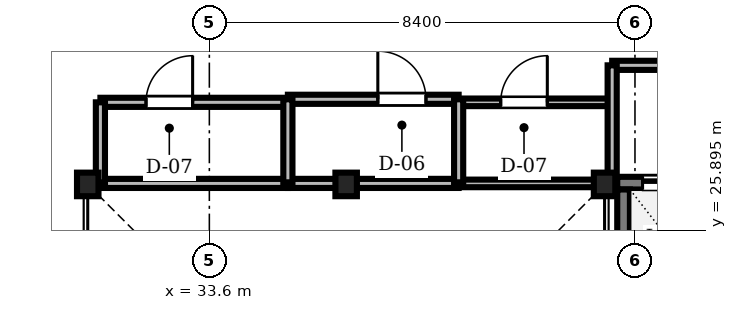
"""IFC4 building model, lengths in metres.
Left out: names, types, materials, properties, quantities, classifications, styles, units other than length and angle.
Written with IfcOpenShell. Run it as: python <this file> out.ifc"""

import sys

from ifc_helpers import new_model, si_unit, direction, frame, frame_2d, origin, origin_2d, place, context, subcontext, project, spatial, rectangle, i_section, extrude, source, transform, mapped, element, fill, save


model = new_model("IFC4")
c1 = context("Model", 3, precision=1e-05, world=origin(), true_north=direction((0.0, 1.0)))
c2 = subcontext(c1, "Body", "Model", "MODEL_VIEW")
j1 = project(units=[si_unit("LENGTHUNIT", "METRE"), si_unit("PLANEANGLEUNIT", "RADIAN")], contexts=[c1])
p1 = place(None, origin())
s1 = spatial("IfcSite", under=j1, at=p1, CompositionType="ELEMENT")
p2 = place(p1, origin())
s2 = spatial("IfcBuilding", under=s1, at=p2, CompositionType="ELEMENT")
p3 = place(p2, frame((0.0, 0.0, 103.7)))
s3 = spatial("IfcBuildingStorey", under=s2, at=p3, CompositionType="ELEMENT", Elevation=103.7)
m1 = source(origin(), c2, "Body", "SweptSolid", [
    extrude(i_section(OverallWidth=0.424, OverallDepth=0.465, WebThickness=0.035, FlangeThickness=0.056, FilletRadius=0.015, at=origin_2d()), origin(), (0.0, 0.0, 1.0), 3.56),
])
for number, where, z_axis, x_axis in (
    (1, (41.4, 26.8, 0.0), (0.0, 0.0, 1.0), (1.0, 0.0, 0.0)),
    (2, (36.3, 26.8, 0.0), (0.0, 0.0, 1.0), (1.0, 0.0, 0.0)),
    (3, (31.2, 26.8, 0.0), (0.0, 0.0, 1.0), (1.0, 0.0, 0.0)),
):
    element("IfcColumn", number, at=place(p3, frame(where, z_axis=z_axis, x_axis=x_axis)), inside=s3, PredefinedType="COLUMN", context=c2, shape_type="MappedRepresentation", body=[
        mapped(m1, transform((0.0, 0.0, 0.0), scale=1.0)),
    ])
m2 = source(origin(), c2, "Body", "SweptSolid", [
    extrude(rectangle(XDim=2.3, YDim=0.25, at=frame_2d((1.15, 0.0))), origin(), (0.0, 0.0, 1.0), 3.56),
])
p4 = place(p3, frame((41.65, 26.825, 0.0), z_axis=(0.0, 0.0, 1.0), x_axis=(1.0, 0.0, 0.0)))
e4 = element("IfcWall", 4, at=p4, inside=s3, PredefinedType="SOLIDWALL", context=c2, shape_type="MappedRepresentation", body=[
    mapped(m2, transform((0.0, 0.0, 0.0), scale=1.0)),
])
m3 = source(origin(), c2, "Body", "SweptSolid", [
    extrude(rectangle(XDim=1.3, YDim=2.3, at=frame_2d((0.65, 1.15))), frame((0.0, 0.135, 0.0), z_axis=(0.0, -1.0, 0.0), x_axis=(1.0, 0.0, 0.0)), (0.0, 0.0, 1.0), 0.27),
])
p5 = place(p4, frame((0.5, 0.0, 0.0)))
e5 = element("IfcOpeningElement", 5, at=p5, cuts=e4, PredefinedType="OPENING", context=c2, shape_type="MappedRepresentation", body=[
    mapped(m3, transform((0.0, 0.0, 0.0), scale=1.0)),
])
p6 = place(p3, frame((41.775, 24.4, 0.0), z_axis=(0.0, 0.0, 1.0), x_axis=(0.0, 1.0, 0.0)))
e6 = element("IfcWall", 6, at=p6, inside=s3, PredefinedType="SOLIDWALL", context=c2, shape_type="MappedRepresentation", body=[
    mapped(m2, transform((0.0, 0.0, 0.0), scale=1.0)),
])
m4 = source(origin(), c2, "Body", "SweptSolid", [
    extrude(rectangle(XDim=4.548, YDim=0.18, at=frame_2d((2.274, 0.0))), origin(), (0.0, 0.0, 1.0), 3.192),
])
p7 = place(p3, frame((41.55, 29.15, 0.0), z_axis=(0.0, 0.0, 1.0), x_axis=(1.0, 0.0, 0.0)))
e7 = element("IfcWall", 7, at=p7, inside=s3, PredefinedType="PARTITIONING", context=c2, shape_type="MappedRepresentation", body=[
    mapped(m4, transform((0.0, 0.0, 0.0), scale=1.0)),
])
m5 = source(origin(), c2, "Body", "SweptSolid", [
    extrude(rectangle(XDim=1.2, YDim=2.2, at=frame_2d((0.6, 1.1))), frame((0.0, 0.1, 0.0), z_axis=(0.0, -1.0, 0.0), x_axis=(1.0, 0.0, 0.0)), (0.0, 0.0, 1.0), 0.2),
])
p8 = place(p7, frame((1.6, 0.0, 0.0)))
e8 = element("IfcOpeningElement", 8, at=p8, cuts=e7, PredefinedType="OPENING", context=c2, shape_type="MappedRepresentation", body=[
    mapped(m5, transform((0.0, 0.0, 0.0), scale=1.0)),
])
m6 = source(origin(), c2, "Body", "SweptSolid", [
    extrude(rectangle(XDim=3.7, YDim=0.18, at=frame_2d((1.85, 0.0))), origin(), (0.0, 0.0, 1.0), 3.192),
])
p9 = place(p3, frame((31.45, 28.42, 0.0), z_axis=(0.0, 0.0, 1.0), x_axis=(1.0, 0.0, 0.0)))
e9 = element("IfcWall", 9, at=p9, inside=s3, PredefinedType="PARTITIONING", context=c2, shape_type="MappedRepresentation", body=[
    mapped(m6, transform((0.0, 0.0, 0.0), scale=1.0)),
])
m7 = source(origin(), c2, "Body", "SweptSolid", [
    extrude(rectangle(XDim=0.92, YDim=2.1, at=frame_2d((0.46, 1.05))), frame((0.0, 0.1, 0.0), z_axis=(0.0, -1.0, 0.0), x_axis=(1.0, 0.0, 0.0)), (0.0, 0.0, 1.0), 0.2),
])
p10 = place(p9, frame((0.9, 0.0, 0.0)))
e10 = element("IfcOpeningElement", 10, at=p10, cuts=e9, PredefinedType="OPENING", context=c2, shape_type="MappedRepresentation", body=[
    mapped(m7, transform((0.0, 0.0, 0.0), scale=1.0)),
])
m8 = source(origin(), c2, "Body", "SweptSolid", [
    extrude(rectangle(XDim=3.37, YDim=0.18, at=frame_2d((1.685, 0.0))), origin(), (0.0, 0.0, 1.0), 3.56),
])
p11 = place(p3, frame((35.15, 28.48, 0.0), z_axis=(0.0, 0.0, 1.0), x_axis=(1.0, 0.0, 0.0)))
e11 = element("IfcWall", 11, at=p11, inside=s3, PredefinedType="PARTITIONING", context=c2, shape_type="MappedRepresentation", body=[
    mapped(m8, transform((0.0, 0.0, 0.0), scale=1.0)),
])
m9 = source(origin(), c2, "Body", "SweptSolid", [
    extrude(rectangle(XDim=0.95, YDim=2.15, at=frame_2d((0.475, 1.075))), frame((0.0, 0.1, 0.0), z_axis=(0.0, -1.0, 0.0), x_axis=(1.0, 0.0, 0.0)), (0.0, 0.0, 1.0), 0.2),
])
p12 = place(p11, frame((1.775, 0.0, 0.0)))
e12 = element("IfcOpeningElement", 12, at=p12, cuts=e11, PredefinedType="OPENING", context=c2, shape_type="MappedRepresentation", body=[
    mapped(m9, transform((0.0, 0.0, 0.0), scale=1.0)),
])
m10 = source(origin(), c2, "Body", "SweptSolid", [
    extrude(rectangle(XDim=3.0, YDim=0.15, at=frame_2d((1.5, 0.0))), origin(), (0.0, 0.0, 1.0), 3.56),
])
p13 = place(p3, frame((38.52, 28.42, 0.0), z_axis=(0.0, 0.0, 1.0), x_axis=(1.0, 0.0, 0.0)))
e13 = element("IfcWall", 13, at=p13, inside=s3, PredefinedType="PARTITIONING", context=c2, shape_type="MappedRepresentation", body=[
    mapped(m10, transform((0.0, 0.0, 0.0), scale=1.0)),
])
m11 = source(origin(), c2, "Body", "SweptSolid", [
    extrude(rectangle(XDim=0.92, YDim=2.1, at=frame_2d((0.46, 1.05))), frame((0.0, 0.085, 0.0), z_axis=(0.0, -1.0, 0.0), x_axis=(1.0, 0.0, 0.0)), (0.0, 0.0, 1.0), 0.17),
])
p14 = place(p13, frame((0.83, 0.0, 0.0)))
e14 = element("IfcOpeningElement", 14, at=p14, cuts=e13, PredefinedType="OPENING", context=c2, shape_type="MappedRepresentation", body=[
    mapped(m11, transform((0.0, 0.0, 0.0), scale=1.0)),
])
m12 = source(origin(), c2, "Body", "SweptSolid", [
    extrude(rectangle(XDim=3.7, YDim=0.18, at=frame_2d((1.85, 0.0))), origin(), (0.0, 0.0, 1.0), 3.102),
])
p15 = place(p3, frame((31.45, 26.82, 0.0), z_axis=(0.0, 0.0, 1.0), x_axis=(1.0, 0.0, 0.0)))
e15 = element("IfcWall", 15, at=p15, inside=s3, PredefinedType="PARTITIONING", context=c2, shape_type="MappedRepresentation", body=[
    mapped(m12, transform((0.0, 0.0, 0.0), scale=1.0)),
])
m13 = source(origin(), c2, "Body", "SweptSolid", [
    extrude(rectangle(XDim=3.37, YDim=0.18, at=frame_2d((1.685, 0.0))), origin(), (0.0, 0.0, 1.0), 3.102),
])
p16 = place(p3, frame((35.15, 26.82, 0.0), z_axis=(0.0, 0.0, 1.0), x_axis=(1.0, 0.0, 0.0)))
e16 = element("IfcWall", 16, at=p16, inside=s3, PredefinedType="PARTITIONING", context=c2, shape_type="MappedRepresentation", body=[
    mapped(m13, transform((0.0, 0.0, 0.0), scale=1.0)),
])
m14 = source(origin(), c2, "Body", "SweptSolid", [
    extrude(rectangle(XDim=3.0, YDim=0.15, at=frame_2d((1.5, 0.0))), origin(), (0.0, 0.0, 1.0), 2.952),
])
p17 = place(p3, frame((38.52, 26.82, 0.0), z_axis=(0.0, 0.0, 1.0), x_axis=(1.0, 0.0, 0.0)))
e17 = element("IfcWall", 17, at=p17, inside=s3, PredefinedType="PARTITIONING", context=c2, shape_type="MappedRepresentation", body=[
    mapped(m14, transform((0.0, 0.0, 0.0), scale=1.0)),
])
m15 = source(origin(), c2, "Body", "SweptSolid", [
    extrude(rectangle(XDim=2.35, YDim=0.18, at=frame_2d((1.175, 0.0))), origin(), (0.0, 0.0, 1.0), 2.952),
])
p18 = place(p3, frame((41.55, 26.8, 0.0), z_axis=(0.0, 0.0, 1.0), x_axis=(0.0, 1.0, 0.0)))
e18 = element("IfcWall", 18, at=p18, inside=s3, PredefinedType="PARTITIONING", context=c2, shape_type="MappedRepresentation", body=[
    mapped(m15, transform((0.0, 0.0, 0.0), scale=1.0)),
])
m16 = source(origin(), c2, "Body", "SweptSolid", [
    extrude(rectangle(XDim=1.66, YDim=0.18, at=frame_2d((0.83, 0.0))), origin(), (0.0, 0.0, 1.0), 3.102),
])
for number, where, z_axis, x_axis in (
    (19, (35.15, 26.82, 0.0), (0.0, 0.0, 1.0), (0.0, 1.0, 0.0)),
    (20, (38.52, 26.82, 0.0), (0.0, 0.0, 1.0), (0.0, 1.0, 0.0)),
):
    element("IfcWall", number, at=place(p3, frame(where, z_axis=z_axis, x_axis=x_axis)), inside=s3, PredefinedType="PARTITIONING", context=c2, shape_type="MappedRepresentation", body=[
        mapped(m16, transform((0.0, 0.0, 0.0), scale=1.0)),
    ])
m17 = source(origin(), c2, "Body", "SweptSolid", [
    extrude(rectangle(XDim=1.6, YDim=0.18, at=frame_2d((0.8, 0.0))), origin(), (0.0, 0.0, 1.0), 3.102),
])
p19 = place(p3, frame((31.45, 26.82, 0.0), z_axis=(0.0, 0.0, 1.0), x_axis=(0.0, 1.0, 0.0)))
e21 = element("IfcWall", 21, at=p19, inside=s3, PredefinedType="PARTITIONING", context=c2, shape_type="MappedRepresentation", body=[
    mapped(m17, transform((0.0, 0.0, 0.0), scale=1.0)),
])
m18 = source(origin(), c2, "Body", "SweptSolid", [
    extrude(rectangle(XDim=1.3, YDim=2.3, at=frame_2d((0.65, 1.15))), frame((0.0, 0.025, 0.0), z_axis=(0.0, -1.0, 0.0), x_axis=(1.0, 0.0, 0.0)), (0.0, 0.0, 1.0), 0.05),
])
p20 = place(p5, origin())
e22 = element("IfcDoor", 22, at=p20, inside=s3, OperationType="DOUBLE_DOOR_SLIDING", PredefinedType="DOOR", context=c2, shape_type="MappedRepresentation", body=[
    mapped(m18, transform((0.0, 0.0, 0.0), scale=1.0)),
])
fill(e5, e22)
m19 = source(origin(), c2, "Body", "SweptSolid", [
    extrude(rectangle(XDim=0.92, YDim=2.1, at=frame_2d((0.46, 1.05))), frame((0.0, 0.025, 0.0), z_axis=(0.0, -1.0, 0.0), x_axis=(1.0, 0.0, 0.0)), (0.0, 0.0, 1.0), 0.05),
])
p21 = place(p10, origin())
e23 = element("IfcDoor", 23, at=p21, inside=s3, OperationType="SINGLE_SWING_RIGHT", PredefinedType="DOOR", context=c2, shape_type="MappedRepresentation", body=[
    mapped(m19, transform((0.0, 0.0, 0.0), scale=1.0)),
])
fill(e10, e23)
m20 = source(origin(), c2, "Body", "SweptSolid", [
    extrude(rectangle(XDim=0.95, YDim=2.15, at=frame_2d((0.475, 1.075))), frame((0.0, 0.025, 0.0), z_axis=(0.0, -1.0, 0.0), x_axis=(1.0, 0.0, 0.0)), (0.0, 0.0, 1.0), 0.05),
])
p22 = place(p12, origin())
e24 = element("IfcDoor", 24, at=p22, inside=s3, OperationType="SINGLE_SWING_LEFT", PredefinedType="DOOR", context=c2, shape_type="MappedRepresentation", body=[
    mapped(m20, transform((0.0, 0.0, 0.0), scale=1.0)),
])
fill(e12, e24)
p23 = place(p14, origin())
e25 = element("IfcDoor", 25, at=p23, inside=s3, OperationType="SINGLE_SWING_RIGHT", PredefinedType="DOOR", context=c2, shape_type="MappedRepresentation", body=[
    mapped(m19, transform((0.0, 0.0, 0.0), scale=1.0)),
])
fill(e14, e25)
save(model, sys.argv[1])
